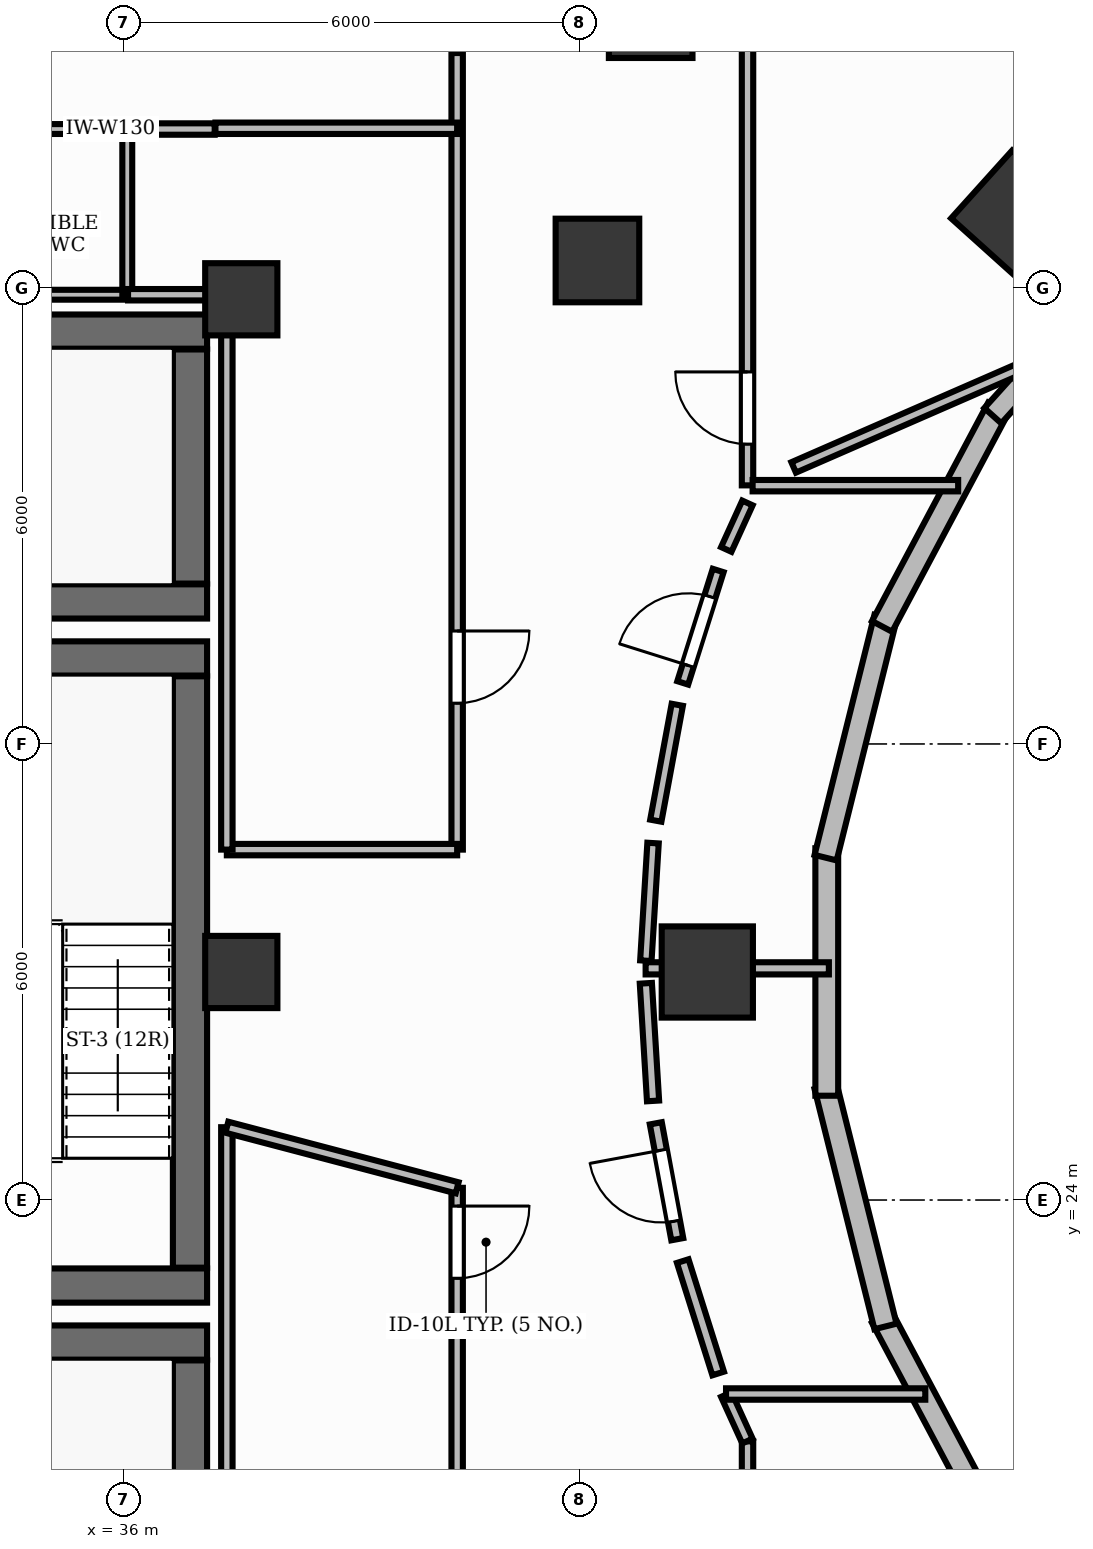
"""IFC4 building model, lengths in metres.
Left out: names, types, materials, properties, quantities, classifications, styles, units other than length and angle.
Written with IfcOpenShell. Run it as: python <this file> out.ifc"""

import sys

from ifc_helpers import new_model, si_unit, direction, frame, frame_2d, origin, origin_2d, place, context, subcontext, project, spatial, rectangle, extrude, element, fill, save


model = new_model("IFC4")
c1 = context("Model", 3, precision=1e-05, world=origin(), true_north=direction((0.0, 1.0)))
c2 = subcontext(c1, "Body", "Model", "MODEL_VIEW")
j1 = project(units=[si_unit("LENGTHUNIT", "METRE"), si_unit("PLANEANGLEUNIT", "RADIAN")], contexts=[c1])
p1 = place(None, origin())
s1 = spatial("IfcSite", under=j1, at=p1, CompositionType="ELEMENT")
p2 = place(p1, origin())
s2 = spatial("IfcBuilding", under=s1, at=p2, CompositionType="ELEMENT")
p3 = place(p2, frame((0.0, 0.0, 106.8)))
s3 = spatial("IfcBuildingStorey", under=s2, at=p3, CompositionType="ELEMENT", Elevation=106.8)
p4 = place(p3, frame((28.852, 35.425, 0.0), z_axis=(0.0, 0.0, 1.0), x_axis=(1.0, 0.0, 0.0)))
e1 = element("IfcWall", 1, at=p4, inside=s3, PredefinedType="SHEAR", context=c2, shape_type="SweptSolid", body=[
    extrude(rectangle(XDim=8.248, YDim=0.45, at=frame_2d((4.124, 0.0))), origin(), (0.0, 0.0, 1.0), 3.9),
])
p5 = place(p3, frame((28.35, 31.875, 0.0), z_axis=(0.0, 0.0, 1.0), x_axis=(1.0, 0.0, 0.0)))
e2 = element("IfcWall", 2, at=p5, inside=s3, PredefinedType="SHEAR", context=c2, shape_type="SweptSolid", body=[
    extrude(rectangle(XDim=8.75, YDim=0.45, at=frame_2d((4.375, 0.0))), origin(), (0.0, 0.0, 1.0), 3.9),
])
p6 = place(p3, frame((36.875, 32.11, 0.0), z_axis=(0.0, 0.0, 1.0), x_axis=(0.0, 1.0, 0.0)))
e3 = element("IfcWall", 3, at=p6, inside=s3, PredefinedType="SHEAR", context=c2, shape_type="SweptSolid", body=[
    extrude(rectangle(XDim=3.08, YDim=0.45, at=frame_2d((1.54, 0.0))), origin(), (0.0, 0.0, 1.0), 3.9),
])
p7 = place(p3, frame((28.35, 22.125, 0.0), z_axis=(0.0, 0.0, 1.0), x_axis=(1.0, 0.0, 0.0)))
e4 = element("IfcWall", 4, at=p7, inside=s3, PredefinedType="SHEAR", context=c2, shape_type="SweptSolid", body=[
    extrude(rectangle(XDim=8.75, YDim=0.45, at=frame_2d((4.375, 0.0))), origin(), (0.0, 0.0, 1.0), 3.9),
])
p8 = place(p3, frame((36.875, 18.81, 0.0), z_axis=(0.0, 0.0, 1.0), x_axis=(0.0, 1.0, 0.0)))
e5 = element("IfcWall", 5, at=p8, inside=s3, PredefinedType="SHEAR", context=c2, shape_type="SweptSolid", body=[
    extrude(rectangle(XDim=3.08, YDim=0.45, at=frame_2d((1.54, 0.0))), origin(), (0.0, 0.0, 1.0), 3.9),
])
for number, where, z_axis, x_axis in (
    (6, (33.1, 31.125, 0.0), (0.0, 0.0, 1.0), (1.0, 0.0, 0.0)),
    (7, (33.1, 22.875, 0.0), (0.0, 0.0, 1.0), (1.0, 0.0, 0.0)),
):
    element("IfcWall", number, at=place(p3, frame(where, z_axis=z_axis, x_axis=x_axis)), inside=s3, PredefinedType="SHEAR", context=c2, shape_type="SweptSolid", body=[
        extrude(rectangle(XDim=4.0, YDim=0.45, at=frame_2d((2.0, 0.0))), origin(), (0.0, 0.0, 1.0), 3.9),
    ])
p9 = place(p3, frame((36.875, 23.11, 0.0), z_axis=(0.0, 0.0, 1.0), x_axis=(0.0, 1.0, 0.0)))
e8 = element("IfcWall", 8, at=p9, inside=s3, PredefinedType="SHEAR", context=c2, shape_type="SweptSolid", body=[
    extrude(rectangle(XDim=7.78, YDim=0.45, at=frame_2d((3.89, 0.0))), origin(), (0.0, 0.0, 1.0), 3.9),
])
for number, where, z_axis, x_axis in (
    (9, (37.55, 35.85, -0.0), (0.0, 0.0, 1.0), (1.0, 0.0, 0.0)),
    (10, (37.55, 27.0, -0.0), (0.0, 0.0, 1.0), (1.0, 0.0, 0.0)),
):
    element("IfcColumn", number, at=place(p3, frame(where, z_axis=z_axis, x_axis=x_axis)), inside=s3, PredefinedType="PILASTER", context=c2, shape_type="SweptSolid", body=[
        extrude(rectangle(XDim=0.95, YDim=0.95, at=origin_2d()), origin(), (0.0, 0.0, 1.0), 3.901),
    ])
p10 = place(p3, frame((42.936, 39.575, -0.0), z_axis=(0.0, 0.0, 1.0), x_axis=(1.0, 0.0, 0.0)))
e11 = element("IfcColumn", 11, at=p10, inside=s3, PredefinedType="COLUMN", context=c2, shape_type="SweptSolid", body=[
    extrude(rectangle(XDim=1.1, YDim=1.1, at=origin_2d()), origin(), (0.0, 0.0, 1.0), 3.901),
])
for number, where, z_axis, x_axis in (
    (12, (43.681, 27.0, -0.0), (0.0, 0.0, 1.0), (0.0, 1.0, 0.0)),
    (13, (47.736, 36.96, -0.0), (0.0, 0.0, 1.0), (0.669, 0.743, 0.0)),
):
    element("IfcColumn", number, at=place(p3, frame(where, z_axis=z_axis, x_axis=x_axis)), inside=s3, PredefinedType="COLUMN", context=c2, shape_type="SweptSolid", body=[
        extrude(rectangle(XDim=1.2, YDim=1.2, at=origin_2d()), origin(), (0.0, 0.0, 1.0), 3.901),
    ])
p11 = place(p3, frame((42.236, 36.361, -0.0), z_axis=(0.0, 0.0, 1.0), x_axis=(1.0, 0.0, 0.0)))
e14 = element("IfcColumn", 14, at=p11, inside=s3, PredefinedType="COLUMN", context=c2, shape_type="SweptSolid", body=[
    extrude(rectangle(XDim=1.1, YDim=1.1, at=origin_2d()), origin(), (0.0, 0.0, 1.0), 3.901),
])
p12 = place(p3, frame((47.509, 19.579, 0.0), z_axis=(0.0, 0.0, 1.0), x_axis=(-0.469451284634, 0.882958374645, 0.0)))
e15 = element("IfcWall", 15, at=p12, inside=s3, PredefinedType="STANDARD", context=c2, shape_type="SweptSolid", body=[
    extrude(rectangle(XDim=3.256, YDim=0.3, at=frame_2d((1.628, 0.0))), origin(), (0.0, 0.0, 1.0), 3.9),
])
p13 = place(p3, frame((46.025, 22.337, 0.0), z_axis=(0.0, 0.0, 1.0), x_axis=(-0.241900409149, 0.970301083197, 0.0)))
e16 = element("IfcWall", 16, at=p13, inside=s3, PredefinedType="STANDARD", context=c2, shape_type="SweptSolid", body=[
    extrude(rectangle(XDim=3.256, YDim=0.3, at=frame_2d((1.628, 0.0))), origin(), (0.0, 0.0, 1.0), 3.9),
])
p14 = place(p3, frame((45.253, 25.372, 0.0), z_axis=(0.0, 0.0, 1.0), x_axis=(0.0, 1.0, 0.0)))
e17 = element("IfcWall", 17, at=p14, inside=s3, PredefinedType="STANDARD", context=c2, shape_type="SweptSolid", body=[
    extrude(rectangle(XDim=3.255, YDim=0.3, at=frame_2d((1.628, 0.0))), origin(), (0.0, 0.0, 1.0), 3.9),
])
p15 = place(p3, frame((45.238, 28.504, 0.0), z_axis=(0.0, 0.0, 1.0), x_axis=(0.241900409149, 0.970301083197, 0.0)))
e18 = element("IfcWall", 18, at=p15, inside=s3, PredefinedType="STANDARD", context=c2, shape_type="SweptSolid", body=[
    extrude(rectangle(XDim=3.256, YDim=0.3, at=frame_2d((1.628, 0.0))), origin(), (0.0, 0.0, 1.0), 3.9),
])
p16 = place(p3, frame((45.98, 31.547, 0.0), z_axis=(0.0, 0.0, 1.0), x_axis=(0.469451284634, 0.882958374645, 0.0)))
e19 = element("IfcWall", 19, at=p16, inside=s3, PredefinedType="STANDARD", context=c2, shape_type="SweptSolid", body=[
    extrude(rectangle(XDim=3.256, YDim=0.3, at=frame_2d((1.628, 0.0))), origin(), (0.0, 0.0, 1.0), 3.9),
])
p17 = place(p3, frame((47.437, 34.319, 0.0), z_axis=(0.0, 0.0, 1.0), x_axis=(0.669167727967, 0.743111399353, 0.0)))
e20 = element("IfcWall", 20, at=p17, inside=s3, PredefinedType="STANDARD", context=c2, shape_type="SweptSolid", body=[
    extrude(rectangle(XDim=3.255, YDim=0.3, at=frame_2d((1.628, 0.0))), origin(), (0.0, 0.0, 1.0), 3.9),
])
p18 = place(p3, frame((33.65, 38.09, 0.0), z_axis=(0.0, 0.0, 1.0), x_axis=(1.0, 0.0, 0.0)))
e21 = element("IfcWall", 21, at=p18, inside=s3, PredefinedType="PARTITIONING", context=c2, shape_type="SweptSolid", body=[
    extrude(rectangle(XDim=2.4, YDim=0.13, at=frame_2d((1.2, 0.0))), origin(), (0.0, 0.0, 1.0), 2.91),
])
p19 = place(p18, frame((0.24, 0.0, 0.0)))
e22 = element("IfcOpeningElement", 22, at=p19, cuts=e21, PredefinedType="OPENING", context=c2, shape_type="SweptSolid", body=[
    extrude(rectangle(XDim=0.9, YDim=2.15, at=frame_2d((0.45, 1.075))), frame((0.0, 0.08, 0.0), z_axis=(0.0, -1.0, 0.0), x_axis=(1.0, 0.0, 0.0)), (0.0, 0.0, 1.0), 0.16),
])
p20 = place(p3, frame((40.39, 24.161, 0.0), z_axis=(0.0, 0.0, 1.0), x_axis=(0.0, -1.0, 0.0)))
e23 = element("IfcWall", 23, at=p20, inside=s3, PredefinedType="PARTITIONING", context=c2, shape_type="SweptSolid", body=[
    extrude(rectangle(XDim=7.661, YDim=0.15, at=frame_2d((3.83, 0.0))), origin(), (0.0, 0.0, 1.0), 2.91),
])
p21 = place(p20, frame((0.24, 0.0, 0.0)))
e24 = element("IfcOpeningElement", 24, at=p21, cuts=e23, PredefinedType="OPENING", context=c2, shape_type="SweptSolid", body=[
    extrude(rectangle(XDim=0.95, YDim=2.15, at=frame_2d((0.475, 1.075))), frame((0.0, 0.09, 0.0), z_axis=(0.0, -1.0, 0.0), x_axis=(1.0, 0.0, 0.0)), (0.0, 0.0, 1.0), 0.18),
])
p22 = place(p3, frame((43.286, 23.485, 0.0), z_axis=(0.0, 0.0, 1.0), x_axis=(-0.182168192784, 0.983267384559, 0.0)))
e25 = element("IfcWall", 25, at=p22, inside=s3, PredefinedType="PARTITIONING", context=c2, shape_type="SweptSolid", body=[
    extrude(rectangle(XDim=1.551, YDim=0.16, at=frame_2d((0.775, 0.0))), origin(), (0.0, 0.0, 1.0), 2.91),
])
p23 = place(p22, frame((0.24, 0.0, 0.0)))
e26 = element("IfcOpeningElement", 26, at=p23, cuts=e25, PredefinedType="OPENING", context=c2, shape_type="SweptSolid", body=[
    extrude(rectangle(XDim=0.95, YDim=2.15, at=frame_2d((0.475, 1.075))), frame((0.0, 0.095, 0.0), z_axis=(0.0, -1.0, 0.0), x_axis=(1.0, 0.0, 0.0)), (0.0, 0.0, 1.0), 0.19),
])
p24 = place(p3, frame((43.358, 30.803, 0.0), z_axis=(0.0, 0.0, 1.0), x_axis=(0.300641414783, 0.953737248783, 0.0)))
e27 = element("IfcWall", 27, at=p24, inside=s3, PredefinedType="PARTITIONING", context=c2, shape_type="SweptSolid", body=[
    extrude(rectangle(XDim=1.55, YDim=0.15, at=frame_2d((0.775, 0.0))), origin(), (0.0, 0.0, 1.0), 2.91),
])
p25 = place(p24, frame((0.24, 0.0, 0.0)))
e28 = element("IfcOpeningElement", 28, at=p25, cuts=e27, PredefinedType="OPENING", context=c2, shape_type="SweptSolid", body=[
    extrude(rectangle(XDim=0.95, YDim=2.15, at=frame_2d((0.475, 1.075))), frame((0.0, 0.09, 0.0), z_axis=(0.0, -1.0, 0.0), x_axis=(1.0, 0.0, 0.0)), (0.0, 0.0, 1.0), 0.18),
])
p26 = place(p3, frame((44.21, 33.402, 0.0), z_axis=(0.0, 0.0, 1.0), x_axis=(0.0, 1.0, 0.0)))
e29 = element("IfcWall", 29, at=p26, inside=s3, PredefinedType="PARTITIONING", context=c2, shape_type="SweptSolid", body=[
    extrude(rectangle(XDim=6.238, YDim=0.15, at=frame_2d((3.119, 0.0))), origin(), (0.0, 0.0, 1.0), 2.91),
])
p27 = place(p26, frame((0.542, 0.0, 0.0)))
e30 = element("IfcOpeningElement", 30, at=p27, cuts=e29, PredefinedType="OPENING", context=c2, shape_type="SweptSolid", body=[
    extrude(rectangle(XDim=0.95, YDim=2.15, at=frame_2d((0.475, 1.075))), frame((0.0, 0.09, 0.0), z_axis=(0.0, -1.0, 0.0), x_axis=(1.0, 0.0, 0.0)), (0.0, 0.0, 1.0), 0.18),
])
p28 = place(p3, frame((40.39, 39.09, 0.0), z_axis=(0.0, 0.0, 1.0), x_axis=(0.0, -1.0, 0.0)))
e31 = element("IfcWall", 31, at=p28, inside=s3, PredefinedType="PARTITIONING", context=c2, shape_type="SweptSolid", body=[
    extrude(rectangle(XDim=10.48, YDim=0.15, at=frame_2d((5.24, 0.0))), origin(), (0.0, 0.0, 1.0), 2.91),
])
p29 = place(p28, frame((7.604, 0.0, 0.0)))
e32 = element("IfcOpeningElement", 32, at=p29, cuts=e31, PredefinedType="OPENING", context=c2, shape_type="SweptSolid", body=[
    extrude(rectangle(XDim=0.95, YDim=2.15, at=frame_2d((0.475, 1.075))), frame((0.0, 0.09, 0.0), z_axis=(0.0, -1.0, 0.0), x_axis=(1.0, 0.0, 0.0)), (0.0, 0.0, 1.0), 0.18),
])
p30 = place(p3, frame((36.05, 35.91, 0.0), z_axis=(0.0, 0.0, 1.0), x_axis=(-1.0, 0.0, 0.0)))
e33 = element("IfcWall", 33, at=p30, inside=s3, PredefinedType="PARTITIONING", context=c2, shape_type="SweptSolid", body=[
    extrude(rectangle(XDim=2.4, YDim=0.13, at=frame_2d((1.2, 0.0))), origin(), (0.0, 0.0, 1.0), 2.91),
])
p31 = place(p3, frame((36.05, 38.09, 0.0), z_axis=(0.0, 0.0, 1.0), x_axis=(0.0, -1.0, 0.0)))
e34 = element("IfcWall", 34, at=p31, inside=s3, PredefinedType="PARTITIONING", context=c2, shape_type="SweptSolid", body=[
    extrude(rectangle(XDim=2.18, YDim=0.13, at=frame_2d((1.09, 0.0))), origin(), (0.0, 0.0, 1.0), 2.91),
])
p32 = place(p3, frame((37.36, 18.1, 0.0), z_axis=(0.0, 0.0, 1.0), x_axis=(0.0, 1.0, 0.0)))
e35 = element("IfcWall", 35, at=p32, inside=s3, PredefinedType="PARTITIONING", context=c2, shape_type="SweptSolid", body=[
    extrude(rectangle(XDim=6.858, YDim=0.15, at=frame_2d((3.429, 0.0))), origin(), (0.0, 0.0, 1.0), 2.91),
])
p33 = place(p3, frame((37.36, 24.958, 0.0), z_axis=(0.0, 0.0, 1.0), x_axis=(0.967070499487, -0.254508642331, 0.0)))
e36 = element("IfcWall", 36, at=p33, inside=s3, PredefinedType="PARTITIONING", context=c2, shape_type="SweptSolid", body=[
    extrude(rectangle(XDim=3.133, YDim=0.15, at=frame_2d((1.566, 0.0))), origin(), (0.0, 0.0, 1.0), 2.91),
])
p34 = place(p3, frame((44.21, 16.5, 0.0), z_axis=(0.0, 0.0, 1.0), x_axis=(0.0, 1.0, 0.0)))
e37 = element("IfcWall", 37, at=p34, inside=s3, PredefinedType="PARTITIONING", context=c2, shape_type="SweptSolid", body=[
    extrude(rectangle(XDim=4.325, YDim=0.15, at=frame_2d((2.163, 0.0))), origin(), (0.0, 0.0, 1.0), 2.91),
])
p35 = place(p3, frame((44.209, 20.829, 0.0), z_axis=(0.0, 0.0, 1.0), x_axis=(-0.414377467152, 0.910105111905, 0.0)))
e38 = element("IfcWall", 38, at=p35, inside=s3, PredefinedType="PARTITIONING", context=c2, shape_type="SweptSolid", body=[
    extrude(rectangle(XDim=0.672, YDim=0.15, at=frame_2d((0.336, 0.0))), origin(), (0.0, 0.0, 1.0), 2.91),
])
p36 = place(p3, frame((43.927, 21.448, 0.0), z_axis=(0.0, 0.0, 1.0), x_axis=(1.0, 0.0, 0.0)))
e39 = element("IfcWall", 39, at=p36, inside=s3, PredefinedType="PARTITIONING", context=c2, shape_type="SweptSolid", body=[
    extrude(rectangle(XDim=2.621, YDim=0.15, at=frame_2d((1.311, 0.0))), origin(), (0.0, 0.0, 1.0), 2.91),
])
for number, where, z_axis, x_axis in (
    (40, (43.824, 21.718, 0.0), (0.0, 0.0, 1.0), (-0.301, 0.954, 0.0)),
    (41, (42.967, 25.304, 0.0), (0.0, 0.0, 1.0), (-0.061, 0.998, 0.0)),
):
    element("IfcWall", number, at=place(p3, frame(where, z_axis=z_axis, x_axis=x_axis)), inside=s3, PredefinedType="PARTITIONING", context=c2, shape_type="SweptSolid", body=[
        extrude(rectangle(XDim=1.55, YDim=0.16, at=frame_2d((0.775, 0.0))), origin(), (0.0, 0.0, 1.0), 2.91),
    ])
p37 = place(p3, frame((42.869, 27.048, 0.0), z_axis=(0.0, 0.0, 1.0), x_axis=(1.0, 0.0, 0.0)))
e42 = element("IfcWall", 42, at=p37, inside=s3, PredefinedType="PARTITIONING", context=c2, shape_type="SweptSolid", body=[
    extrude(rectangle(XDim=2.411, YDim=0.16, at=frame_2d((1.206, 0.0))), origin(), (0.0, 0.0, 1.0), 2.91),
])
p38 = place(p3, frame((42.873, 27.149, 0.0), z_axis=(0.0, 0.0, 1.0), x_axis=(0.061103659378, 0.99813142562, 0.0)))
e43 = element("IfcWall", 43, at=p38, inside=s3, PredefinedType="PARTITIONING", context=c2, shape_type="SweptSolid", body=[
    extrude(rectangle(XDim=1.55, YDim=0.15, at=frame_2d((0.775, 0.0))), origin(), (0.0, 0.0, 1.0), 2.91),
])
p39 = place(p3, frame((43.003, 28.991, 0.0), z_axis=(0.0, 0.0, 1.0), x_axis=(0.182168192784, 0.983267384559, 0.0)))
e44 = element("IfcWall", 44, at=p39, inside=s3, PredefinedType="PARTITIONING", context=c2, shape_type="SweptSolid", body=[
    extrude(rectangle(XDim=1.551, YDim=0.15, at=frame_2d((0.775, 0.0))), origin(), (0.0, 0.0, 1.0), 2.91),
])
p40 = place(p3, frame((43.93, 32.559, 0.0), z_axis=(0.0, 0.0, 1.0), x_axis=(0.414377467152, 0.910105111905, 0.0)))
e45 = element("IfcWall", 45, at=p40, inside=s3, PredefinedType="PARTITIONING", context=c2, shape_type="SweptSolid", body=[
    extrude(rectangle(XDim=0.672, YDim=0.15, at=frame_2d((0.336, 0.0))), origin(), (0.0, 0.0, 1.0), 2.91),
])
p41 = place(p3, frame((44.277, 33.398, 0.0), z_axis=(0.0, 0.0, 1.0), x_axis=(1.0, 0.0, 0.0)))
e46 = element("IfcWall", 46, at=p41, inside=s3, PredefinedType="PARTITIONING", context=c2, shape_type="SweptSolid", body=[
    extrude(rectangle(XDim=2.704, YDim=0.15, at=frame_2d((1.352, 0.0))), origin(), (0.0, 0.0, 1.0), 2.91),
])
p42 = place(p3, frame((47.897, 34.982, 0.0), z_axis=(0.0, 0.0, 1.0), x_axis=(-0.916547126563, -0.399926699271, 0.0)))
e47 = element("IfcWall", 47, at=p42, inside=s3, PredefinedType="PARTITIONING", context=c2, shape_type="SweptSolid", body=[
    extrude(rectangle(XDim=3.36, YDim=0.15, at=frame_2d((1.68, 0.0))), origin(), (0.0, 0.0, 1.0), 2.91),
])
p43 = place(p3, frame((37.35, 35.91, 0.0), z_axis=(0.0, 0.0, 1.0), x_axis=(-1.0, 0.0, 0.0)))
e48 = element("IfcWall", 48, at=p43, inside=s3, PredefinedType="PARTITIONING", context=c2, shape_type="SweptSolid", body=[
    extrude(rectangle(XDim=1.29, YDim=0.15, at=frame_2d((0.645, 0.0))), origin(), (0.0, 0.0, 1.0), 2.91),
])
p44 = place(p3, frame((36.06, 38.09, 0.0), z_axis=(0.0, 0.0, 1.0), x_axis=(1.0, 0.0, 0.0)))
e49 = element("IfcWall", 49, at=p44, inside=s3, PredefinedType="PARTITIONING", context=c2, shape_type="SweptSolid", body=[
    extrude(rectangle(XDim=1.14, YDim=0.15, at=frame_2d((0.57, 0.0))), origin(), (0.0, 0.0, 1.0), 2.91),
])
p45 = place(p3, frame((37.21, 38.1, 0.0), z_axis=(0.0, 0.0, 1.0), x_axis=(1.0, 0.0, 0.0)))
e50 = element("IfcWall", 50, at=p45, inside=s3, PredefinedType="PARTITIONING", context=c2, shape_type="SweptSolid", body=[
    extrude(rectangle(XDim=3.18, YDim=0.15, at=frame_2d((1.59, 0.0))), origin(), (0.0, 0.0, 1.0), 2.91),
])
p46 = place(p3, frame((40.39, 28.61, 0.0), z_axis=(0.0, 0.0, 1.0), x_axis=(-1.0, 0.0, 0.0)))
e51 = element("IfcWall", 51, at=p46, inside=s3, PredefinedType="PARTITIONING", context=c2, shape_type="SweptSolid", body=[
    extrude(rectangle(XDim=3.03, YDim=0.15, at=frame_2d((1.515, 0.0))), origin(), (0.0, 0.0, 1.0), 2.91),
])
p47 = place(p3, frame((37.36, 28.61, 0.0), z_axis=(0.0, 0.0, 1.0), x_axis=(0.0, 1.0, 0.0)))
e52 = element("IfcWall", 52, at=p47, inside=s3, PredefinedType="PARTITIONING", context=c2, shape_type="SweptSolid", body=[
    extrude(rectangle(XDim=7.29, YDim=0.15, at=frame_2d((3.645, 0.0))), origin(), (0.0, 0.0, 1.0), 2.91),
])
p48 = place(p21, origin())
e53 = element("IfcDoor", 53, at=p48, inside=s3, OperationType="SINGLE_SWING_LEFT", PredefinedType="DOOR", context=c2, shape_type="SweptSolid", body=[
    extrude(rectangle(XDim=0.95, YDim=2.15, at=frame_2d((0.475, 1.075))), frame((0.0, 0.025, 0.0), z_axis=(0.0, -1.0, 0.0), x_axis=(1.0, 0.0, 0.0)), (0.0, 0.0, 1.0), 0.05),
])
fill(e24, e53)
p49 = place(p23, origin())
e54 = element("IfcDoor", 54, at=p49, inside=s3, OperationType="SINGLE_SWING_RIGHT", PredefinedType="DOOR", context=c2, shape_type="SweptSolid", body=[
    extrude(rectangle(XDim=0.95, YDim=2.15, at=frame_2d((0.475, 1.075))), frame((0.0, 0.025, 0.0), z_axis=(0.0, -1.0, 0.0), x_axis=(1.0, 0.0, 0.0)), (0.0, 0.0, 1.0), 0.05),
])
fill(e26, e54)
p50 = place(p25, origin())
e55 = element("IfcDoor", 55, at=p50, inside=s3, OperationType="SINGLE_SWING_LEFT", PredefinedType="DOOR", context=c2, shape_type="SweptSolid", body=[
    extrude(rectangle(XDim=0.95, YDim=2.15, at=frame_2d((0.475, 1.075))), frame((0.0, 0.025, 0.0), z_axis=(0.0, -1.0, 0.0), x_axis=(1.0, 0.0, 0.0)), (0.0, 0.0, 1.0), 0.05),
])
fill(e28, e55)
p51 = place(p27, origin())
e56 = element("IfcDoor", 56, at=p51, inside=s3, OperationType="SINGLE_SWING_RIGHT", PredefinedType="DOOR", context=c2, shape_type="SweptSolid", body=[
    extrude(rectangle(XDim=0.95, YDim=2.15, at=frame_2d((0.475, 1.075))), frame((0.0, 0.025, 0.0), z_axis=(0.0, -1.0, 0.0), x_axis=(1.0, 0.0, 0.0)), (0.0, 0.0, 1.0), 0.05),
])
fill(e30, e56)
p52 = place(p29, origin())
e57 = element("IfcDoor", 57, at=p52, inside=s3, OperationType="SINGLE_SWING_LEFT", PredefinedType="DOOR", context=c2, shape_type="SweptSolid", body=[
    extrude(rectangle(XDim=0.95, YDim=2.15, at=frame_2d((0.475, 1.075))), frame((0.0, 0.025, 0.0), z_axis=(0.0, -1.0, 0.0), x_axis=(1.0, 0.0, 0.0)), (0.0, 0.0, 1.0), 0.05),
])
fill(e32, e57)
save(model, sys.argv[1])
